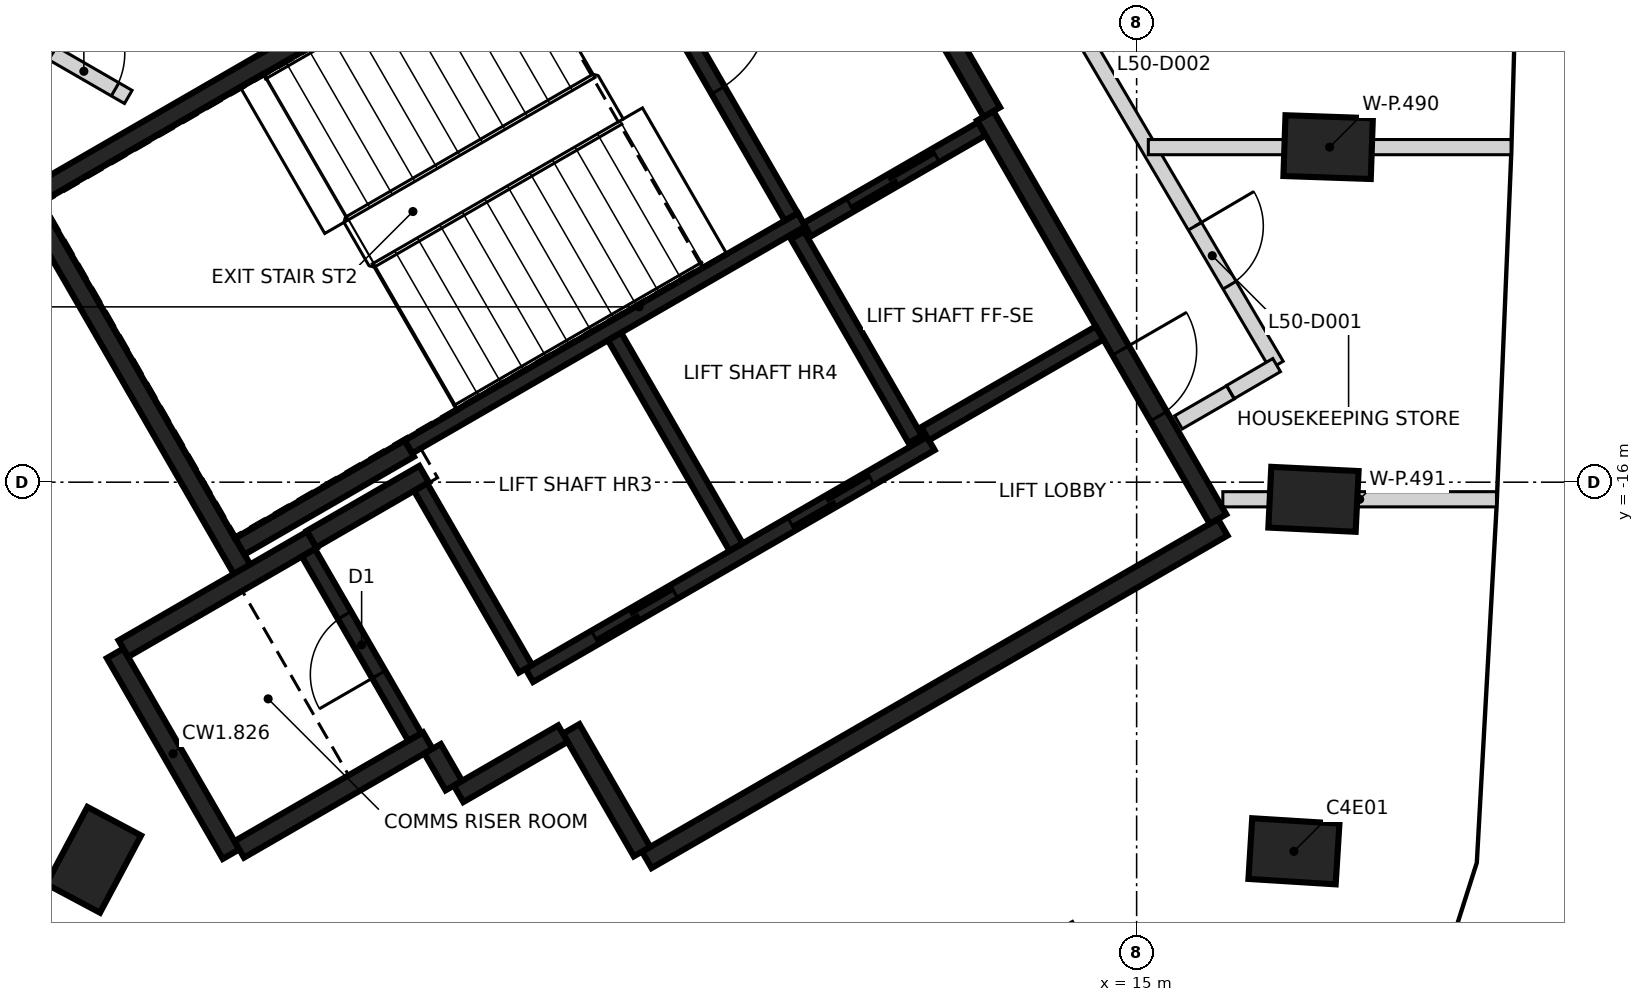
"""IFC4 building model, lengths in metres.
Left out: names, types, materials, properties, quantities, classifications, styles, units other than length and angle.
Written with IfcOpenShell. Run it as: python <this file> out.ifc"""

import sys

from ifc_helpers import new_model, si_unit, direction, frame, frame_2d, origin, origin_2d, place, context, subcontext, project, spatial, rectangle, extrude, element, fill, save


model = new_model("IFC4")
c1 = context("Model", 3, precision=1e-05, world=origin(), true_north=direction((0.0, 1.0)))
c2 = subcontext(c1, "Body", "Model", "MODEL_VIEW")
j1 = project(units=[si_unit("LENGTHUNIT", "METRE"), si_unit("PLANEANGLEUNIT", "RADIAN")], contexts=[c1])
p1 = place(None, origin())
s1 = spatial("IfcSite", under=j1, at=p1, CompositionType="ELEMENT")
p2 = place(p1, origin())
s2 = spatial("IfcBuilding", under=s1, at=p2, CompositionType="ELEMENT")
p3 = place(p2, frame((0.0, 0.0, 200.8)))
s3 = spatial("IfcBuildingStorey", under=s2, at=p3, CompositionType="ELEMENT", Elevation=200.8)
for number, where, z_axis, x_axis in (
    (1, (17.07, -20.856, -0.35), (0.0, 0.0, 1.0), (-0.998, 0.062, 0.0)),
    (2, (17.326, -16.226, -0.35), (0.0, 0.0, 1.0), (-0.999, 0.048, 0.0)),
    (3, (17.519, -11.592, -0.35), (0.0, 0.0, 1.0), (-0.999, 0.034, 0.0)),
    (4, (1.279, -20.968, -0.35), (0.0, 0.0, 1.0), (0.47, 0.883, 0.0)),
):
    element("IfcColumn", number, at=place(p3, frame(where, z_axis=z_axis, x_axis=x_axis)), inside=s3, PredefinedType="COLUMN", context=c2, shape_type="SweptSolid", body=[
        extrude(rectangle(XDim=1.15, YDim=0.8, at=origin_2d()), origin(), (0.0, 0.0, 1.0), 3.6),
    ])
p4 = place(p3, frame((0.417, -12.273, 0.0), z_axis=(0.0, 0.0, 1.0), x_axis=(0.866021906294, 0.500006057782, 0.0)))
e5 = element("IfcWall", 5, at=p4, inside=s3, PredefinedType="SHEAR", context=c2, shape_type="SweptSolid", body=[
    extrude(rectangle(XDim=11.55, YDim=0.25, at=frame_2d((5.775, 0.0))), origin(), (0.0, 0.0, 1.0), 3.25),
])
p5 = place(p4, frame((10.025, 0.0, 0.0)))
e6 = element("IfcOpeningElement", 6, at=p5, cuts=e5, PredefinedType="OPENING", context=c2, shape_type="SweptSolid", body=[
    extrude(rectangle(XDim=1.2, YDim=2.1, at=frame_2d((0.6, 1.05))), frame((0.0, 0.135, 0.0), z_axis=(0.0, -1.0, 0.0), x_axis=(1.0, 0.0, 0.0)), (0.0, 0.0, 1.0), 0.27),
])
p6 = place(p4, frame((8.725, 0.0, 0.0)))
e7 = element("IfcOpeningElement", 7, at=p6, cuts=e5, PredefinedType="OPENING", context=c2, shape_type="SweptSolid", body=[
    extrude(rectangle(XDim=1.2, YDim=2.1, at=frame_2d((0.6, 1.05))), frame((0.0, 0.135, 0.0), z_axis=(0.0, -1.0, 0.0), x_axis=(1.0, 0.0, 0.0)), (0.0, 0.0, 1.0), 0.27),
])
p7 = place(p3, frame((16.133, -16.594, 0.0), z_axis=(0.0, 0.0, 1.0), x_axis=(-0.866022959057, -0.500004234368, 0.0)))
e8 = element("IfcWall", 8, at=p7, inside=s3, PredefinedType="SHEAR", context=c2, shape_type="SweptSolid", body=[
    extrude(rectangle(XDim=8.75, YDim=0.25, at=frame_2d((4.375, 0.0))), origin(), (0.0, 0.0, 1.0), 3.25),
])
p8 = place(p3, frame((13.008, -11.181, 0.0), z_axis=(0.0, 0.0, 1.0), x_axis=(0.500001955336, -0.866024274868, 0.0)))
e9 = element("IfcWall", 9, at=p8, inside=s3, PredefinedType="SHEAR", context=c2, shape_type="SweptSolid", body=[
    extrude(rectangle(XDim=6.125, YDim=0.25, at=frame_2d((3.062, 0.0))), origin(), (0.0, 0.0, 1.0), 3.25),
])
p9 = place(p8, frame((3.563, 0.0, 0.0)))
e10 = element("IfcOpeningElement", 10, at=p9, cuts=e9, PredefinedType="OPENING", context=c2, shape_type="SweptSolid", body=[
    extrude(rectangle(XDim=1.0, YDim=2.1, at=frame_2d((0.5, 1.05))), frame((0.0, 0.135, 0.0), z_axis=(0.0, -1.0, 0.0), x_axis=(1.0, 0.0, 0.0)), (0.0, 0.0, 1.0), 0.27),
])
p10 = place(p3, frame((3.235, -17.153, 0.0), z_axis=(0.0, 0.0, 1.0), x_axis=(-0.500008851346, 0.866020293397, 0.0)))
e11 = element("IfcWall", 11, at=p10, inside=s3, PredefinedType="SHEAR", context=c2, shape_type="SweptSolid", body=[
    extrude(rectangle(XDim=5.51, YDim=0.25, at=frame_2d((2.755, 0.0))), origin(), (0.0, 0.0, 1.0), 3.25),
])
p11 = place(p3, frame((10.483, -6.606, 0.0), z_axis=(0.0, 0.0, 1.0), x_axis=(0.49999885962, -0.866026062182, 0.0)))
e12 = element("IfcWall", 12, at=p11, inside=s3, PredefinedType="SHEAR", context=c2, shape_type="SweptSolid", body=[
    extrude(rectangle(XDim=5.225, YDim=0.25, at=frame_2d((2.612, 0.0))), origin(), (0.0, 0.0, 1.0), 3.25),
])
p12 = place(p3, frame((3.085, -20.894, 0.0), z_axis=(0.0, 0.0, 1.0), x_axis=(-0.499978833458, 0.866037623948, 0.0)))
e13 = element("IfcWall", 13, at=p12, inside=s3, PredefinedType="SHEAR", context=c2, shape_type="SweptSolid", body=[
    extrude(rectangle(XDim=3.05, YDim=0.25, at=frame_2d((1.525, 0.0))), origin(), (0.0, 0.0, 1.0), 3.25),
])
p13 = place(p3, frame((1.669, -18.19, 0.0), z_axis=(0.0, 0.0, 1.0), x_axis=(0.866042235819, 0.499970844928, 0.0)))
e14 = element("IfcWall", 14, at=p13, inside=s3, PredefinedType="SHEAR", context=c2, shape_type="SweptSolid", body=[
    extrude(rectangle(XDim=2.865, YDim=0.25, at=frame_2d((1.432, 0.0))), origin(), (0.0, 0.0, 1.0), 3.25),
])
p14 = place(p3, frame((5.675, -19.399, 0.0), z_axis=(0.0, 0.0, 1.0), x_axis=(-0.866026637627, -0.499997862916, 0.0)))
e15 = element("IfcWall", 15, at=p14, inside=s3, PredefinedType="SHEAR", context=c2, shape_type="SweptSolid", body=[
    extrude(rectangle(XDim=2.865, YDim=0.25, at=frame_2d((1.432, 0.0))), origin(), (0.0, 0.0, 1.0), 3.25),
])
p15 = place(p3, frame((5.431, -15.556, 0.0), z_axis=(0.0, 0.0, 1.0), x_axis=(-0.866022940537, -0.500004266446, 0.0)))
e16 = element("IfcWall", 16, at=p15, inside=s3, PredefinedType="SHEAR", context=c2, shape_type="SweptSolid", body=[
    extrude(rectangle(XDim=2.575, YDim=0.25, at=frame_2d((1.287, 0.0))), origin(), (0.0, 0.0, 1.0), 3.25),
])
p16 = place(p3, frame((8.493, -20.86, 0.0), z_axis=(0.0, 0.0, 1.0), x_axis=(-0.500039802285, 0.866002422705, 0.0)))
e17 = element("IfcWall", 17, at=p16, inside=s3, PredefinedType="SHEAR", context=c2, shape_type="SweptSolid", body=[
    extrude(rectangle(XDim=1.865, YDim=0.25, at=frame_2d((0.932, 0.0))), origin(), (0.0, 0.0, 1.0), 3.25),
])
p17 = place(p3, frame((4.145, -16.749, 0.0), z_axis=(0.0, 0.0, 1.0), x_axis=(0.866038183914, 0.499977863513, 0.0)))
e18 = element("IfcWall", 18, at=p17, inside=s3, PredefinedType="SHEAR", context=c2, shape_type="SweptSolid", body=[
    extrude(rectangle(XDim=1.71, YDim=0.25, at=frame_2d((0.855, 0.0))), origin(), (0.0, 0.0, 1.0), 3.25),
])
p18 = place(p3, frame((7.452, -19.308, 0.0), z_axis=(0.0, 0.0, 1.0), x_axis=(-0.866044474677, -0.49996696679, 0.0)))
e19 = element("IfcWall", 19, at=p18, inside=s3, PredefinedType="SHEAR", context=c2, shape_type="SweptSolid", body=[
    extrude(rectangle(XDim=1.584, YDim=0.25, at=frame_2d((0.792, 0.0))), origin(), (0.0, 0.0, 1.0), 3.25),
])
p19 = place(p3, frame((6.017, -19.992, 0.0), z_axis=(0.0, 0.0, 1.0), x_axis=(-0.500364886717, 0.865814633822, 0.0)))
e20 = element("IfcWall", 20, at=p19, inside=s3, PredefinedType="SHEAR", context=c2, shape_type="SweptSolid", body=[
    extrude(rectangle(XDim=0.559, YDim=0.25, at=frame_2d((0.28, 0.0))), origin(), (0.0, 0.0, 1.0), 3.25),
])
p20 = place(p3, frame((5.419, -15.534, 0.0), z_axis=(0.0, 0.0, 1.0), x_axis=(0.866029065029, 0.499993658486, 0.0)))
e21 = element("IfcWall", 21, at=p20, inside=s3, PredefinedType="SHEAR", context=c2, shape_type="SweptSolid", body=[
    extrude(rectangle(XDim=5.974, YDim=0.2, at=frame_2d((2.987, 0.0))), origin(), (0.0, 0.0, 1.0), 3.25),
])
p21 = place(p3, frame((7.01, -18.542, 0.0), z_axis=(0.0, 0.0, 1.0), x_axis=(0.866030299012, 0.499991521122, 0.0)))
e22 = element("IfcWall", 22, at=p21, inside=s3, PredefinedType="SHEAR", context=c2, shape_type="SweptSolid", body=[
    extrude(rectangle(XDim=6.1, YDim=0.2, at=frame_2d((3.05, 0.0))), origin(), (0.0, 0.0, 1.0), 3.25),
])
p22 = place(p21, frame((1.0, 0.0, 0.0)))
e23 = element("IfcOpeningElement", 23, at=p22, cuts=e22, PredefinedType="OPENING", context=c2, shape_type="SweptSolid", body=[
    extrude(rectangle(XDim=1.2, YDim=2.1, at=frame_2d((0.6, 1.05))), frame((0.0, 0.11, 0.0), z_axis=(0.0, -1.0, 0.0), x_axis=(1.0, 0.0, 0.0)), (0.0, 0.0, 1.0), 0.22),
])
p23 = place(p21, frame((3.982, 0.0, 0.0)))
e24 = element("IfcOpeningElement", 24, at=p23, cuts=e22, PredefinedType="OPENING", context=c2, shape_type="SweptSolid", body=[
    extrude(rectangle(XDim=1.2, YDim=2.1, at=frame_2d((0.6, 1.05))), frame((0.0, 0.11, 0.0), z_axis=(0.0, -1.0, 0.0), x_axis=(1.0, 0.0, 0.0)), (0.0, 0.0, 1.0), 0.22),
])
p24 = place(p3, frame((7.906, -8.094, 0.0), z_axis=(0.0, 0.0, 1.0), x_axis=(0.500027839223, -0.866009330205, 0.0)))
e25 = element("IfcWall", 25, at=p24, inside=s3, PredefinedType="SHEAR", context=c2, shape_type="SweptSolid", body=[
    extrude(rectangle(XDim=5.098, YDim=0.2, at=frame_2d((2.549, 0.0))), origin(), (0.0, 0.0, 1.0), 3.25),
])
p25 = place(p24, frame((1.774, 0.0, 0.0)))
e26 = element("IfcOpeningElement", 26, at=p25, cuts=e25, PredefinedType="OPENING", context=c2, shape_type="SweptSolid", body=[
    extrude(rectangle(XDim=1.4, YDim=2.1, at=frame_2d((0.7, 1.05))), frame((0.0, 0.11, 0.0), z_axis=(0.0, -1.0, 0.0), x_axis=(1.0, 0.0, 0.0)), (0.0, 0.0, 1.0), 0.22),
])
p26 = place(p3, frame((8.132, -14.084, 0.0), z_axis=(0.0, 0.0, 1.0), x_axis=(0.499997778408, -0.866026686418, 0.0)))
e27 = element("IfcWall", 27, at=p26, inside=s3, PredefinedType="SHEAR", context=c2, shape_type="SweptSolid", body=[
    extrude(rectangle(XDim=3.198, YDim=0.2, at=frame_2d((1.599, 0.0))), origin(), (0.0, 0.0, 1.0), 3.25),
])
p27 = place(p3, frame((5.503, -19.352, 0.0), z_axis=(0.0, 0.0, 1.0), x_axis=(-0.499986818241, 0.866033014143, 0.0)))
e28 = element("IfcWall", 28, at=p27, inside=s3, PredefinedType="SHEAR", context=c2, shape_type="SweptSolid", body=[
    extrude(rectangle(XDim=2.798, YDim=0.2, at=frame_2d((1.399, 0.0))), origin(), (0.0, 0.0, 1.0), 3.25),
])
p28 = place(p27, frame((0.949, 0.0, 0.0)))
e29 = element("IfcOpeningElement", 29, at=p28, cuts=e28, PredefinedType="OPENING", context=c2, shape_type="SweptSolid", body=[
    extrude(rectangle(XDim=0.9, YDim=2.1, at=frame_2d((0.45, 1.05))), frame((0.0, 0.11, 0.0), z_axis=(0.0, -1.0, 0.0), x_axis=(1.0, 0.0, 0.0)), (0.0, 0.0, 1.0), 0.22),
])
p29 = place(p3, frame((6.96, -18.455, 0.0), z_axis=(0.0, 0.0, 1.0), x_axis=(-0.499926705758, 0.866067716099, 0.0)))
e30 = element("IfcWall", 30, at=p29, inside=s3, PredefinedType="SHEAR", context=c2, shape_type="SweptSolid", body=[
    extrude(rectangle(XDim=2.759, YDim=0.2, at=frame_2d((1.38, 0.0))), origin(), (0.0, 0.0, 1.0), 3.25),
])
p30 = place(p3, frame((12.088, -15.437, 0.0), z_axis=(0.0, 0.0, 1.0), x_axis=(-0.500026960575, 0.86600983753, 0.0)))
e31 = element("IfcWall", 31, at=p30, inside=s3, PredefinedType="SHEAR", context=c2, shape_type="SweptSolid", body=[
    extrude(rectangle(XDim=3.1, YDim=0.2, at=frame_2d((1.55, 0.0))), origin(), (0.0, 0.0, 1.0), 3.25),
])
p31 = place(p3, frame((10.666, -12.678, 0.0), z_axis=(0.0, 0.0, 1.0), x_axis=(0.866018407898, 0.500012117035, 0.0)))
e32 = element("IfcWall", 32, at=p31, inside=s3, PredefinedType="SHEAR", context=c2, shape_type="SweptSolid", body=[
    extrude(rectangle(XDim=2.651, YDim=0.2, at=frame_2d((1.325, 0.0))), origin(), (0.0, 0.0, 1.0), 3.25),
])
p32 = place(p31, frame((0.652, 0.0, 0.0)))
e33 = element("IfcOpeningElement", 33, at=p32, cuts=e32, PredefinedType="OPENING", context=c2, shape_type="SweptSolid", body=[
    extrude(rectangle(XDim=1.3, YDim=2.1, at=frame_2d((0.65, 1.05))), frame((0.0, 0.11, 0.0), z_axis=(0.0, -1.0, 0.0), x_axis=(1.0, 0.0, 0.0)), (0.0, 0.0, 1.0), 0.22),
])
p33 = place(p3, frame((14.512, -14.037, 0.0), z_axis=(0.0, 0.0, 1.0), x_axis=(-0.866018407898, -0.500012117035, 0.0)))
e34 = element("IfcWall", 34, at=p33, inside=s3, PredefinedType="SHEAR", context=c2, shape_type="SweptSolid", body=[
    extrude(rectangle(XDim=2.651, YDim=0.2, at=frame_2d((1.325, 0.0))), origin(), (0.0, 0.0, 1.0), 3.25),
])
p34 = place(p3, frame((-8.601, -4.965, 0.0), z_axis=(0.0, 0.0, 1.0), x_axis=(0.866011155539, -0.500024677872, 0.0)))
e35 = element("IfcWall", 35, at=p34, inside=s3, PredefinedType="PARTITIONING", context=c2, shape_type="SweptSolid", body=[
    extrude(rectangle(XDim=11.934, YDim=0.2, at=frame_2d((5.967, 0.0))), origin(), (0.0, 0.0, 1.0), 3.25),
])
p35 = place(p34, frame((5.039, 0.0, 0.0)))
e36 = element("IfcOpeningElement", 36, at=p35, cuts=e35, PredefinedType="OPENING", context=c2, shape_type="SweptSolid", body=[
    extrude(rectangle(XDim=0.95, YDim=2.1, at=frame_2d((0.475, 1.05))), frame((0.0, 0.11, 0.0), z_axis=(0.0, -1.0, 0.0), x_axis=(1.0, 0.0, 0.0)), (0.0, 0.0, 1.0), 0.22),
])
p36 = place(p34, frame((10.784, 0.0, 0.0)))
e37 = element("IfcOpeningElement", 37, at=p36, cuts=e35, PredefinedType="OPENING", context=c2, shape_type="SweptSolid", body=[
    extrude(rectangle(XDim=0.95, YDim=2.1, at=frame_2d((0.475, 1.05))), frame((0.0, 0.11, 0.0), z_axis=(0.0, -1.0, 0.0), x_axis=(1.0, 0.0, 0.0)), (0.0, 0.0, 1.0), 0.22),
])
p37 = place(p3, frame((11.573, -5.504, 0.0), z_axis=(0.0, 0.0, 1.0), x_axis=(0.507120747865, -0.861875018251, 0.0)))
e38 = element("IfcWall", 38, at=p37, inside=s3, PredefinedType="PARTITIONING", context=c2, shape_type="SweptSolid", body=[
    extrude(rectangle(XDim=10.391, YDim=0.2, at=frame_2d((5.196, 0.0))), origin(), (0.0, 0.0, 1.0), 3.25),
])
p38 = place(p37, frame((8.271, 0.0, 0.0)))
e39 = element("IfcOpeningElement", 39, at=p38, cuts=e38, PredefinedType="OPENING", context=c2, shape_type="SweptSolid", body=[
    extrude(rectangle(XDim=0.9, YDim=2.1, at=frame_2d((0.45, 1.05))), frame((0.0, 0.11, 0.0), z_axis=(0.0, -1.0, 0.0), x_axis=(1.0, 0.0, 0.0)), (0.0, 0.0, 1.0), 0.22),
])
p39 = place(p37, frame((4.321, 0.0, 0.0)))
e40 = element("IfcOpeningElement", 40, at=p39, cuts=e38, PredefinedType="OPENING", context=c2, shape_type="SweptSolid", body=[
    extrude(rectangle(XDim=0.95, YDim=2.1, at=frame_2d((0.475, 1.05))), frame((0.0, 0.11, 0.0), z_axis=(0.0, -1.0, 0.0), x_axis=(1.0, 0.0, 0.0)), (0.0, 0.0, 1.0), 0.22),
])
p40 = place(p3, frame((15.55, -15.213, 0.0), z_axis=(0.0, 0.0, 1.0), x_axis=(0.865989998118, 0.500061319399, 0.0)))
e41 = element("IfcWall", 41, at=p40, inside=s3, PredefinedType="PARTITIONING", context=c2, shape_type="SweptSolid", body=[
    extrude(rectangle(XDim=0.79, YDim=0.2, at=frame_2d((0.395, 0.0))), origin(), (0.0, 0.0, 1.0), 3.25),
])
p41 = place(p3, frame((16.235, -14.814, 0.0), z_axis=(0.0, 0.0, 1.0), x_axis=(0.863804104711, 0.503827816505, 0.0)))
e42 = element("IfcWall", 42, at=p41, inside=s3, PredefinedType="PARTITIONING", context=c2, shape_type="SweptSolid", body=[
    extrude(rectangle(XDim=0.703, YDim=0.2, at=frame_2d((0.351, 0.0))), origin(), (0.0, 0.0, 1.0), 3.25),
])
p42 = place(p3, frame((15.154, -11.592, 0.0), z_axis=(0.0, 0.0, 1.0), x_axis=(1.0, 0.0, 0.0)))
e43 = element("IfcWall", 43, at=p42, inside=s3, PredefinedType="PARTITIONING", context=c2, shape_type="SweptSolid", body=[
    extrude(rectangle(XDim=4.772, YDim=0.2, at=frame_2d((2.386, 0.0))), origin(), (0.0, 0.0, 1.0), 3.25),
])
p43 = place(p3, frame((16.134, -16.225, 0.0), z_axis=(0.0, 0.0, 1.0), x_axis=(1.0, 0.0, 0.0)))
e44 = element("IfcWall", 44, at=p43, inside=s3, PredefinedType="PARTITIONING", context=c2, shape_type="SweptSolid", body=[
    extrude(rectangle(XDim=3.6, YDim=0.2, at=frame_2d((1.8, 0.0))), origin(), (0.0, 0.0, 1.0), 3.25),
])
p44 = place(p32, origin())
e45 = element("IfcDoor", 45, at=p44, inside=s3, OperationType="SLIDING_TO_LEFT", PredefinedType="DOOR", context=c2, shape_type="SweptSolid", body=[
    extrude(rectangle(XDim=1.3, YDim=2.1, at=frame_2d((0.65, 1.05))), frame((0.0, 0.025, 0.0), z_axis=(0.0, -1.0, 0.0), x_axis=(1.0, 0.0, 0.0)), (0.0, 0.0, 1.0), 0.05),
])
fill(e33, e45)
p45 = place(p22, origin())
e46 = element("IfcDoor", 46, at=p45, inside=s3, OperationType="DOUBLE_DOOR_SLIDING", PredefinedType="DOOR", context=c2, shape_type="SweptSolid", body=[
    extrude(rectangle(XDim=1.2, YDim=2.1, at=frame_2d((0.6, 1.05))), frame((0.0, 0.025, 0.0), z_axis=(0.0, -1.0, 0.0), x_axis=(1.0, 0.0, 0.0)), (0.0, 0.0, 1.0), 0.05),
])
fill(e23, e46)
p46 = place(p23, origin())
e47 = element("IfcDoor", 47, at=p46, inside=s3, OperationType="DOUBLE_DOOR_SLIDING", PredefinedType="DOOR", context=c2, shape_type="SweptSolid", body=[
    extrude(rectangle(XDim=1.2, YDim=2.1, at=frame_2d((0.6, 1.05))), frame((0.0, 0.025, 0.0), z_axis=(0.0, -1.0, 0.0), x_axis=(1.0, 0.0, 0.0)), (0.0, 0.0, 1.0), 0.05),
])
fill(e24, e47)
p47 = place(p9, origin())
e48 = element("IfcDoor", 48, at=p47, inside=s3, OperationType="SINGLE_SWING_LEFT", PredefinedType="DOOR", context=c2, shape_type="SweptSolid", body=[
    extrude(rectangle(XDim=1.0, YDim=2.1, at=frame_2d((0.5, 1.05))), frame((0.0, 0.025, 0.0), z_axis=(0.0, -1.0, 0.0), x_axis=(1.0, 0.0, 0.0)), (0.0, 0.0, 1.0), 0.05),
])
fill(e10, e48)
p48 = place(p25, origin())
e49 = element("IfcDoor", 49, at=p48, inside=s3, OperationType="SINGLE_SWING_LEFT", PredefinedType="DOOR", context=c2, shape_type="SweptSolid", body=[
    extrude(rectangle(XDim=1.4, YDim=2.1, at=frame_2d((0.7, 1.05))), frame((0.0, 0.025, 0.0), z_axis=(0.0, -1.0, 0.0), x_axis=(1.0, 0.0, 0.0)), (0.0, 0.0, 1.0), 0.05),
])
fill(e26, e49)
p49 = place(p28, origin())
e50 = element("IfcDoor", 50, at=p49, inside=s3, OperationType="SINGLE_SWING_RIGHT", PredefinedType="DOOR", context=c2, shape_type="SweptSolid", body=[
    extrude(rectangle(XDim=0.9, YDim=2.1, at=frame_2d((0.45, 1.05))), frame((0.0, 0.025, 0.0), z_axis=(0.0, -1.0, 0.0), x_axis=(1.0, 0.0, 0.0)), (0.0, 0.0, 1.0), 0.05),
])
fill(e29, e50)
p50 = place(p38, origin())
e51 = element("IfcDoor", 51, at=p50, inside=s3, OperationType="SINGLE_SWING_LEFT", PredefinedType="DOOR", context=c2, shape_type="SweptSolid", body=[
    extrude(rectangle(XDim=0.9, YDim=2.1, at=frame_2d((0.45, 1.05))), frame((0.0, 0.025, 0.0), z_axis=(0.0, -1.0, 0.0), x_axis=(1.0, 0.0, 0.0)), (0.0, 0.0, 1.0), 0.05),
])
fill(e39, e51)
p51 = place(p36, frame((0.95, 0.0, 0.0), z_axis=(0.0, 0.0, 1.0), x_axis=(-1.0, 0.0, 0.0)))
e52 = element("IfcDoor", 52, at=p51, inside=s3, OperationType="SINGLE_SWING_LEFT", PredefinedType="DOOR", context=c2, shape_type="SweptSolid", body=[
    extrude(rectangle(XDim=0.95, YDim=2.1, at=frame_2d((0.475, 1.05))), frame((0.0, 0.025, 0.0), z_axis=(0.0, -1.0, 0.0), x_axis=(1.0, 0.0, 0.0)), (0.0, 0.0, 1.0), 0.05),
])
fill(e37, e52)
save(model, sys.argv[1])
